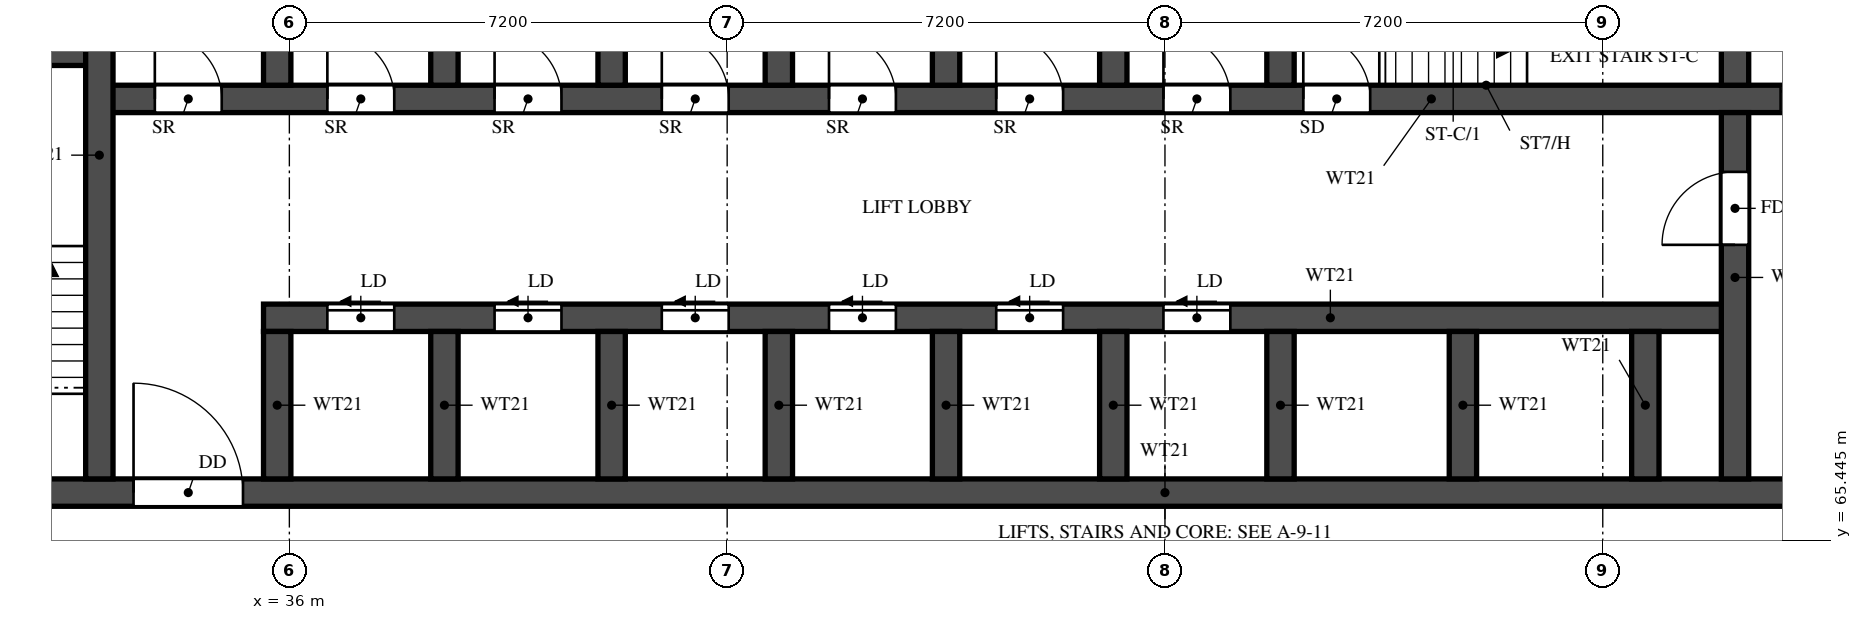
"""IFC4 building model, lengths in metres.
Left out: names, types, materials, properties, quantities, classifications, styles, units other than length and angle.
Written with IfcOpenShell. Run it as: python <this file> out.ifc"""

import sys

from ifc_helpers import new_model, si_unit, direction, frame, frame_2d, origin, place, context, subcontext, project, spatial, rectangle, extrude, element, fill, save


model = new_model("IFC4")
c1 = context("Model", 3, precision=1e-05, world=origin(), true_north=direction((0.0, 1.0)))
c2 = subcontext(c1, "Body", "Model", "MODEL_VIEW")
j1 = project(units=[si_unit("LENGTHUNIT", "METRE"), si_unit("PLANEANGLEUNIT", "RADIAN")], contexts=[c1])
p1 = place(None, origin())
s1 = spatial("IfcSite", under=j1, at=p1, CompositionType="ELEMENT")
p2 = place(p1, origin())
s2 = spatial("IfcBuilding", under=s1, at=p2, CompositionType="ELEMENT")
p3 = place(p2, frame((0.0, 0.0, 69.0)))
s3 = spatial("IfcBuildingStorey", under=s2, at=p3, CompositionType="ELEMENT", Elevation=69.0)
p4 = place(p3, frame((29.7, 66.225, 0.0), z_axis=(0.0, 0.0, 1.0), x_axis=(1.0, 0.0, 0.0)))
e1 = element("IfcWall", 1, at=p4, inside=s3, PredefinedType="SHEAR", context=c2, shape_type="SweptSolid", body=[
    extrude(rectangle(XDim=41.4, YDim=0.45, at=frame_2d((20.7, 0.0))), origin(), (0.0, 0.0, 1.0), 3.18),
])
p5 = place(p4, frame((0.925, 0.0, 0.0)))
e2 = element("IfcOpeningElement", 2, at=p5, cuts=e1, PredefinedType="OPENING", context=c2, shape_type="SweptSolid", body=[
    extrude(rectangle(XDim=1.1, YDim=2.1, at=frame_2d((0.55, 1.05))), frame((0.0, 0.235, 0.0), z_axis=(0.0, -1.0, 0.0), x_axis=(1.0, 0.0, 0.0)), (0.0, 0.0, 1.0), 0.47),
])
p6 = place(p4, frame((3.738, 0.0, 0.0)))
e3 = element("IfcOpeningElement", 3, at=p6, cuts=e1, PredefinedType="OPENING", context=c2, shape_type="SweptSolid", body=[
    extrude(rectangle(XDim=1.8, YDim=2.1, at=frame_2d((0.9, 1.05))), frame((0.0, 0.235, 0.0), z_axis=(0.0, -1.0, 0.0), x_axis=(1.0, 0.0, 0.0)), (0.0, 0.0, 1.0), 0.47),
])
p7 = place(p3, frame((35.575, 69.1, 0.0), z_axis=(0.0, 0.0, 1.0), x_axis=(1.0, 0.0, 0.0)))
e4 = element("IfcWall", 4, at=p7, inside=s3, PredefinedType="SHEAR", context=c2, shape_type="SweptSolid", body=[
    extrude(rectangle(XDim=24.2, YDim=0.45, at=frame_2d((12.1, 0.0))), origin(), (0.0, 0.0, 1.0), 3.18),
])
p8 = place(p7, frame((1.05, 0.0, 0.0)))
e5 = element("IfcOpeningElement", 5, at=p8, cuts=e4, PredefinedType="OPENING", context=c2, shape_type="SweptSolid", body=[
    extrude(rectangle(XDim=1.1, YDim=2.1, at=frame_2d((0.55, 1.05))), frame((0.0, 0.235, 0.0), z_axis=(0.0, -1.0, 0.0), x_axis=(1.0, 0.0, 0.0)), (0.0, 0.0, 1.0), 0.47),
])
p9 = place(p7, frame((3.8, 0.0, 0.0)))
e6 = element("IfcOpeningElement", 6, at=p9, cuts=e4, PredefinedType="OPENING", context=c2, shape_type="SweptSolid", body=[
    extrude(rectangle(XDim=1.1, YDim=2.1, at=frame_2d((0.55, 1.05))), frame((0.0, 0.235, 0.0), z_axis=(0.0, -1.0, 0.0), x_axis=(1.0, 0.0, 0.0)), (0.0, 0.0, 1.0), 0.47),
])
p10 = place(p7, frame((6.55, 0.0, 0.0)))
e7 = element("IfcOpeningElement", 7, at=p10, cuts=e4, PredefinedType="OPENING", context=c2, shape_type="SweptSolid", body=[
    extrude(rectangle(XDim=1.1, YDim=2.1, at=frame_2d((0.55, 1.05))), frame((0.0, 0.235, 0.0), z_axis=(0.0, -1.0, 0.0), x_axis=(1.0, 0.0, 0.0)), (0.0, 0.0, 1.0), 0.47),
])
p11 = place(p7, frame((9.3, 0.0, 0.0)))
e8 = element("IfcOpeningElement", 8, at=p11, cuts=e4, PredefinedType="OPENING", context=c2, shape_type="SweptSolid", body=[
    extrude(rectangle(XDim=1.1, YDim=2.1, at=frame_2d((0.55, 1.05))), frame((0.0, 0.235, 0.0), z_axis=(0.0, -1.0, 0.0), x_axis=(1.0, 0.0, 0.0)), (0.0, 0.0, 1.0), 0.47),
])
p12 = place(p7, frame((12.05, 0.0, 0.0)))
e9 = element("IfcOpeningElement", 9, at=p12, cuts=e4, PredefinedType="OPENING", context=c2, shape_type="SweptSolid", body=[
    extrude(rectangle(XDim=1.1, YDim=2.1, at=frame_2d((0.55, 1.05))), frame((0.0, 0.235, 0.0), z_axis=(0.0, -1.0, 0.0), x_axis=(1.0, 0.0, 0.0)), (0.0, 0.0, 1.0), 0.47),
])
p13 = place(p7, frame((14.8, 0.0, 0.0)))
e10 = element("IfcOpeningElement", 10, at=p13, cuts=e4, PredefinedType="OPENING", context=c2, shape_type="SweptSolid", body=[
    extrude(rectangle(XDim=1.1, YDim=2.1, at=frame_2d((0.55, 1.05))), frame((0.0, 0.235, 0.0), z_axis=(0.0, -1.0, 0.0), x_axis=(1.0, 0.0, 0.0)), (0.0, 0.0, 1.0), 0.47),
])
p14 = place(p3, frame((32.875, 72.7, 0.0), z_axis=(0.0, 0.0, 1.0), x_axis=(1.0, 0.0, 0.0)))
e11 = element("IfcWall", 11, at=p14, inside=s3, PredefinedType="SHEAR", context=c2, shape_type="SweptSolid", body=[
    extrude(rectangle(XDim=35.05, YDim=0.45, at=frame_2d((17.525, 0.0))), origin(), (0.0, 0.0, 1.0), 3.18),
])
p15 = place(p14, frame((19.8, 0.0, 0.0)))
e12 = element("IfcOpeningElement", 12, at=p15, cuts=e11, PredefinedType="OPENING", context=c2, shape_type="SweptSolid", body=[
    extrude(rectangle(XDim=1.1, YDim=2.1, at=frame_2d((0.55, 1.05))), frame((0.0, 0.235, 0.0), z_axis=(0.0, -1.0, 0.0), x_axis=(1.0, 0.0, 0.0)), (0.0, 0.0, 1.0), 0.47),
])
p16 = place(p14, frame((27.65, 0.0, 0.0)))
e13 = element("IfcOpeningElement", 13, at=p16, cuts=e11, PredefinedType="OPENING", context=c2, shape_type="SweptSolid", body=[
    extrude(rectangle(XDim=1.1, YDim=2.1, at=frame_2d((0.55, 1.05))), frame((0.0, 0.235, 0.0), z_axis=(0.0, -1.0, 0.0), x_axis=(1.0, 0.0, 0.0)), (0.0, 0.0, 1.0), 0.47),
])
p17 = place(p14, frame((30.25, 0.0, 0.0)))
e14 = element("IfcOpeningElement", 14, at=p17, cuts=e11, PredefinedType="OPENING", context=c2, shape_type="SweptSolid", body=[
    extrude(rectangle(XDim=1.1, YDim=2.1, at=frame_2d((0.55, 1.05))), frame((0.0, 0.235, 0.0), z_axis=(0.0, -1.0, 0.0), x_axis=(1.0, 0.0, 0.0)), (0.0, 0.0, 1.0), 0.47),
])
p18 = place(p14, frame((3.75, 0.0, 0.0)))
e15 = element("IfcOpeningElement", 15, at=p18, cuts=e11, PredefinedType="OPENING", context=c2, shape_type="SweptSolid", body=[
    extrude(rectangle(XDim=1.1, YDim=2.1, at=frame_2d((0.55, 1.05))), frame((0.0, 0.235, 0.0), z_axis=(0.0, -1.0, 0.0), x_axis=(1.0, 0.0, 0.0)), (0.0, 0.0, 1.0), 0.47),
])
p19 = place(p14, frame((6.5, 0.0, 0.0)))
e16 = element("IfcOpeningElement", 16, at=p19, cuts=e11, PredefinedType="OPENING", context=c2, shape_type="SweptSolid", body=[
    extrude(rectangle(XDim=1.1, YDim=2.1, at=frame_2d((0.55, 1.05))), frame((0.0, 0.235, 0.0), z_axis=(0.0, -1.0, 0.0), x_axis=(1.0, 0.0, 0.0)), (0.0, 0.0, 1.0), 0.47),
])
p20 = place(p14, frame((9.25, 0.0, 0.0)))
e17 = element("IfcOpeningElement", 17, at=p20, cuts=e11, PredefinedType="OPENING", context=c2, shape_type="SweptSolid", body=[
    extrude(rectangle(XDim=1.1, YDim=2.1, at=frame_2d((0.55, 1.05))), frame((0.0, 0.235, 0.0), z_axis=(0.0, -1.0, 0.0), x_axis=(1.0, 0.0, 0.0)), (0.0, 0.0, 1.0), 0.47),
])
p21 = place(p14, frame((12.0, 0.0, 0.0)))
e18 = element("IfcOpeningElement", 18, at=p21, cuts=e11, PredefinedType="OPENING", context=c2, shape_type="SweptSolid", body=[
    extrude(rectangle(XDim=1.1, YDim=2.1, at=frame_2d((0.55, 1.05))), frame((0.0, 0.235, 0.0), z_axis=(0.0, -1.0, 0.0), x_axis=(1.0, 0.0, 0.0)), (0.0, 0.0, 1.0), 0.47),
])
p22 = place(p14, frame((14.75, 0.0, 0.0)))
e19 = element("IfcOpeningElement", 19, at=p22, cuts=e11, PredefinedType="OPENING", context=c2, shape_type="SweptSolid", body=[
    extrude(rectangle(XDim=1.1, YDim=2.1, at=frame_2d((0.55, 1.05))), frame((0.0, 0.235, 0.0), z_axis=(0.0, -1.0, 0.0), x_axis=(1.0, 0.0, 0.0)), (0.0, 0.0, 1.0), 0.47),
])
p23 = place(p14, frame((17.5, 0.0, 0.0)))
e20 = element("IfcOpeningElement", 20, at=p23, cuts=e11, PredefinedType="OPENING", context=c2, shape_type="SweptSolid", body=[
    extrude(rectangle(XDim=1.1, YDim=2.1, at=frame_2d((0.55, 1.05))), frame((0.0, 0.235, 0.0), z_axis=(0.0, -1.0, 0.0), x_axis=(1.0, 0.0, 0.0)), (0.0, 0.0, 1.0), 0.47),
])
p24 = place(p14, frame((0.913, 0.0, 0.0)))
e21 = element("IfcOpeningElement", 21, at=p24, cuts=e11, PredefinedType="OPENING", context=c2, shape_type="SweptSolid", body=[
    extrude(rectangle(XDim=1.1, YDim=2.1, at=frame_2d((0.55, 1.05))), frame((0.0, 0.235, 0.0), z_axis=(0.0, -1.0, 0.0), x_axis=(1.0, 0.0, 0.0)), (0.0, 0.0, 1.0), 0.47),
])
p25 = place(p3, frame((29.7, 73.475, 0.0), z_axis=(0.0, 0.0, 1.0), x_axis=(1.0, 0.0, 0.0)))
e22 = element("IfcWall", 22, at=p25, inside=s3, PredefinedType="SHEAR", context=c2, shape_type="SweptSolid", body=[
    extrude(rectangle(XDim=3.175, YDim=0.45, at=frame_2d((1.587, 0.0))), origin(), (0.0, 0.0, 1.0), 3.18),
])
p26 = place(p3, frame((32.875, 66.45, 0.0), z_axis=(0.0, 0.0, 1.0), x_axis=(0.0, 1.0, 0.0)))
e23 = element("IfcWall", 23, at=p26, inside=s3, PredefinedType="SHEAR", context=c2, shape_type="SweptSolid", body=[
    extrude(rectangle(XDim=10.65, YDim=0.45, at=frame_2d((5.325, 0.0))), origin(), (0.0, 0.0, 1.0), 3.18),
])
p27 = place(p3, frame((59.775, 66.45, 0.0), z_axis=(0.0, 0.0, 1.0), x_axis=(0.0, 1.0, 0.0)))
e24 = element("IfcWall", 24, at=p27, inside=s3, PredefinedType="SHEAR", context=c2, shape_type="SweptSolid", body=[
    extrude(rectangle(XDim=6.025, YDim=0.45, at=frame_2d((3.013, 0.0))), origin(), (0.0, 0.0, 1.0), 3.18),
])
p28 = place(p27, frame((3.85, 0.0, 0.0)))
e25 = element("IfcOpeningElement", 25, at=p28, cuts=e24, PredefinedType="OPENING", context=c2, shape_type="SweptSolid", body=[
    extrude(rectangle(XDim=1.2, YDim=2.1, at=frame_2d((0.6, 1.05))), frame((0.0, 0.235, 0.0), z_axis=(0.0, -1.0, 0.0), x_axis=(1.0, 0.0, 0.0)), (0.0, 0.0, 1.0), 0.47),
])
p29 = place(p3, frame((59.775, 72.925, 0.0), z_axis=(0.0, 0.0, 1.0), x_axis=(0.0, 1.0, 0.0)))
e26 = element("IfcWall", 26, at=p29, inside=s3, PredefinedType="SHEAR", context=c2, shape_type="SweptSolid", body=[
    extrude(rectangle(XDim=2.95, YDim=0.45, at=frame_2d((1.475, 0.0))), origin(), (0.0, 0.0, 1.0), 3.18),
])
for number, where, z_axis, x_axis in (
    (27, (35.8, 66.45, 0.0), (0.0, 0.0, 1.0), (0.0, 1.0, 0.0)),
    (28, (38.55, 66.45, 0.0), (0.0, 0.0, 1.0), (0.0, 1.0, 0.0)),
    (29, (41.3, 66.45, 0.0), (0.0, 0.0, 1.0), (0.0, 1.0, 0.0)),
    (30, (44.05, 66.45, 0.0), (0.0, 0.0, 1.0), (0.0, 1.0, 0.0)),
    (31, (46.8, 66.45, 0.0), (0.0, 0.0, 1.0), (0.0, 1.0, 0.0)),
    (32, (49.55, 66.45, 0.0), (0.0, 0.0, 1.0), (0.0, 1.0, 0.0)),
    (33, (52.3, 66.45, 0.0), (0.0, 0.0, 1.0), (0.0, 1.0, 0.0)),
    (34, (55.3, 66.45, 0.0), (0.0, 0.0, 1.0), (0.0, 1.0, 0.0)),
    (35, (58.3, 66.45, 0.0), (0.0, 0.0, 1.0), (0.0, 1.0, 0.0)),
):
    element("IfcWall", number, at=place(p3, frame(where, z_axis=z_axis, x_axis=x_axis)), inside=s3, PredefinedType="SHEAR", context=c2, shape_type="SweptSolid", body=[
        extrude(rectangle(XDim=2.425, YDim=0.45, at=frame_2d((1.212, 0.0))), origin(), (0.0, 0.0, 1.0), 3.18),
    ])
for number, where, z_axis, x_axis in (
    (36, (35.8, 72.925, 0.0), (0.0, 0.0, 1.0), (0.0, 1.0, 0.0)),
    (37, (38.55, 72.925, 0.0), (0.0, 0.0, 1.0), (0.0, 1.0, 0.0)),
    (38, (41.3, 72.925, 0.0), (0.0, 0.0, 1.0), (0.0, 1.0, 0.0)),
    (39, (44.05, 72.925, 0.0), (0.0, 0.0, 1.0), (0.0, 1.0, 0.0)),
    (40, (46.8, 72.925, 0.0), (0.0, 0.0, 1.0), (0.0, 1.0, 0.0)),
    (41, (49.55, 72.925, 0.0), (0.0, 0.0, 1.0), (0.0, 1.0, 0.0)),
    (42, (52.3, 72.925, 0.0), (0.0, 0.0, 1.0), (0.0, 1.0, 0.0)),
):
    element("IfcWall", number, at=place(p3, frame(where, z_axis=z_axis, x_axis=x_axis)), inside=s3, PredefinedType="SHEAR", context=c2, shape_type="SweptSolid", body=[
        extrude(rectangle(XDim=2.95, YDim=0.45, at=frame_2d((1.475, 0.0))), origin(), (0.0, 0.0, 1.0), 3.18),
    ])
p30 = place(p15, origin())
e43 = element("IfcDoor", 43, at=p30, inside=s3, OperationType="SINGLE_SWING_LEFT", PredefinedType="DOOR", context=c2, shape_type="SweptSolid", body=[
    extrude(rectangle(XDim=1.1, YDim=2.1, at=frame_2d((0.55, 1.05))), frame((0.0, 0.025, 0.0), z_axis=(0.0, -1.0, 0.0), x_axis=(1.0, 0.0, 0.0)), (0.0, 0.0, 1.0), 0.05),
])
fill(e12, e43)
p31 = place(p6, origin())
e44 = element("IfcDoor", 44, at=p31, inside=s3, OperationType="DOUBLE_DOOR_SINGLE_SWING", PredefinedType="DOOR", context=c2, shape_type="SweptSolid", body=[
    extrude(rectangle(XDim=1.8, YDim=2.1, at=frame_2d((0.9, 1.05))), frame((0.0, 0.025, 0.0), z_axis=(0.0, -1.0, 0.0), x_axis=(1.0, 0.0, 0.0)), (0.0, 0.0, 1.0), 0.05),
])
fill(e3, e44)
p32 = place(p28, origin())
e45 = element("IfcDoor", 45, at=p32, inside=s3, OperationType="SINGLE_SWING_RIGHT", PredefinedType="DOOR", context=c2, shape_type="SweptSolid", body=[
    extrude(rectangle(XDim=1.2, YDim=2.1, at=frame_2d((0.6, 1.05))), frame((0.0, 0.025, 0.0), z_axis=(0.0, -1.0, 0.0), x_axis=(1.0, 0.0, 0.0)), (0.0, 0.0, 1.0), 0.05),
])
fill(e25, e45)
p33 = place(p16, origin())
e46 = element("IfcDoor", 46, at=p33, inside=s3, OperationType="SLIDING_TO_LEFT", PredefinedType="DOOR", context=c2, shape_type="SweptSolid", body=[
    extrude(rectangle(XDim=1.1, YDim=2.1, at=frame_2d((0.55, 1.05))), frame((0.0, 0.025, 0.0), z_axis=(0.0, -1.0, 0.0), x_axis=(1.0, 0.0, 0.0)), (0.0, 0.0, 1.0), 0.05),
])
fill(e13, e46)
p34 = place(p8, origin())
e47 = element("IfcDoor", 47, at=p34, inside=s3, OperationType="SLIDING_TO_LEFT", PredefinedType="DOOR", context=c2, shape_type="SweptSolid", body=[
    extrude(rectangle(XDim=1.1, YDim=2.1, at=frame_2d((0.55, 1.05))), frame((0.0, 0.025, 0.0), z_axis=(0.0, -1.0, 0.0), x_axis=(1.0, 0.0, 0.0)), (0.0, 0.0, 1.0), 0.05),
])
fill(e5, e47)
p35 = place(p9, origin())
e48 = element("IfcDoor", 48, at=p35, inside=s3, OperationType="SLIDING_TO_LEFT", PredefinedType="DOOR", context=c2, shape_type="SweptSolid", body=[
    extrude(rectangle(XDim=1.1, YDim=2.1, at=frame_2d((0.55, 1.05))), frame((0.0, 0.025, 0.0), z_axis=(0.0, -1.0, 0.0), x_axis=(1.0, 0.0, 0.0)), (0.0, 0.0, 1.0), 0.05),
])
fill(e6, e48)
p36 = place(p10, origin())
e49 = element("IfcDoor", 49, at=p36, inside=s3, OperationType="SLIDING_TO_LEFT", PredefinedType="DOOR", context=c2, shape_type="SweptSolid", body=[
    extrude(rectangle(XDim=1.1, YDim=2.1, at=frame_2d((0.55, 1.05))), frame((0.0, 0.025, 0.0), z_axis=(0.0, -1.0, 0.0), x_axis=(1.0, 0.0, 0.0)), (0.0, 0.0, 1.0), 0.05),
])
fill(e7, e49)
p37 = place(p11, origin())
e50 = element("IfcDoor", 50, at=p37, inside=s3, OperationType="SLIDING_TO_LEFT", PredefinedType="DOOR", context=c2, shape_type="SweptSolid", body=[
    extrude(rectangle(XDim=1.1, YDim=2.1, at=frame_2d((0.55, 1.05))), frame((0.0, 0.025, 0.0), z_axis=(0.0, -1.0, 0.0), x_axis=(1.0, 0.0, 0.0)), (0.0, 0.0, 1.0), 0.05),
])
fill(e8, e50)
p38 = place(p12, origin())
e51 = element("IfcDoor", 51, at=p38, inside=s3, OperationType="SLIDING_TO_LEFT", PredefinedType="DOOR", context=c2, shape_type="SweptSolid", body=[
    extrude(rectangle(XDim=1.1, YDim=2.1, at=frame_2d((0.55, 1.05))), frame((0.0, 0.025, 0.0), z_axis=(0.0, -1.0, 0.0), x_axis=(1.0, 0.0, 0.0)), (0.0, 0.0, 1.0), 0.05),
])
fill(e9, e51)
p39 = place(p13, origin())
e52 = element("IfcDoor", 52, at=p39, inside=s3, OperationType="SLIDING_TO_LEFT", PredefinedType="DOOR", context=c2, shape_type="SweptSolid", body=[
    extrude(rectangle(XDim=1.1, YDim=2.1, at=frame_2d((0.55, 1.05))), frame((0.0, 0.025, 0.0), z_axis=(0.0, -1.0, 0.0), x_axis=(1.0, 0.0, 0.0)), (0.0, 0.0, 1.0), 0.05),
])
fill(e10, e52)
p40 = place(p18, origin())
e53 = element("IfcDoor", 53, at=p40, inside=s3, OperationType="SINGLE_SWING_LEFT", PredefinedType="DOOR", context=c2, shape_type="SweptSolid", body=[
    extrude(rectangle(XDim=1.1, YDim=2.1, at=frame_2d((0.55, 1.05))), frame((0.0, 0.025, 0.0), z_axis=(0.0, -1.0, 0.0), x_axis=(1.0, 0.0, 0.0)), (0.0, 0.0, 1.0), 0.05),
])
fill(e15, e53)
p41 = place(p19, origin())
e54 = element("IfcDoor", 54, at=p41, inside=s3, OperationType="SINGLE_SWING_LEFT", PredefinedType="DOOR", context=c2, shape_type="SweptSolid", body=[
    extrude(rectangle(XDim=1.1, YDim=2.1, at=frame_2d((0.55, 1.05))), frame((0.0, 0.025, 0.0), z_axis=(0.0, -1.0, 0.0), x_axis=(1.0, 0.0, 0.0)), (0.0, 0.0, 1.0), 0.05),
])
fill(e16, e54)
p42 = place(p20, origin())
e55 = element("IfcDoor", 55, at=p42, inside=s3, OperationType="SINGLE_SWING_LEFT", PredefinedType="DOOR", context=c2, shape_type="SweptSolid", body=[
    extrude(rectangle(XDim=1.1, YDim=2.1, at=frame_2d((0.55, 1.05))), frame((0.0, 0.025, 0.0), z_axis=(0.0, -1.0, 0.0), x_axis=(1.0, 0.0, 0.0)), (0.0, 0.0, 1.0), 0.05),
])
fill(e17, e55)
p43 = place(p21, origin())
e56 = element("IfcDoor", 56, at=p43, inside=s3, OperationType="SINGLE_SWING_LEFT", PredefinedType="DOOR", context=c2, shape_type="SweptSolid", body=[
    extrude(rectangle(XDim=1.1, YDim=2.1, at=frame_2d((0.55, 1.05))), frame((0.0, 0.025, 0.0), z_axis=(0.0, -1.0, 0.0), x_axis=(1.0, 0.0, 0.0)), (0.0, 0.0, 1.0), 0.05),
])
fill(e18, e56)
p44 = place(p22, origin())
e57 = element("IfcDoor", 57, at=p44, inside=s3, OperationType="SINGLE_SWING_LEFT", PredefinedType="DOOR", context=c2, shape_type="SweptSolid", body=[
    extrude(rectangle(XDim=1.1, YDim=2.1, at=frame_2d((0.55, 1.05))), frame((0.0, 0.025, 0.0), z_axis=(0.0, -1.0, 0.0), x_axis=(1.0, 0.0, 0.0)), (0.0, 0.0, 1.0), 0.05),
])
fill(e19, e57)
p45 = place(p23, origin())
e58 = element("IfcDoor", 58, at=p45, inside=s3, OperationType="SINGLE_SWING_LEFT", PredefinedType="DOOR", context=c2, shape_type="SweptSolid", body=[
    extrude(rectangle(XDim=1.1, YDim=2.1, at=frame_2d((0.55, 1.05))), frame((0.0, 0.025, 0.0), z_axis=(0.0, -1.0, 0.0), x_axis=(1.0, 0.0, 0.0)), (0.0, 0.0, 1.0), 0.05),
])
fill(e20, e58)
p46 = place(p24, origin())
e59 = element("IfcDoor", 59, at=p46, inside=s3, OperationType="SINGLE_SWING_LEFT", PredefinedType="DOOR", context=c2, shape_type="SweptSolid", body=[
    extrude(rectangle(XDim=1.1, YDim=2.1, at=frame_2d((0.55, 1.05))), frame((0.0, 0.025, 0.0), z_axis=(0.0, -1.0, 0.0), x_axis=(1.0, 0.0, 0.0)), (0.0, 0.0, 1.0), 0.05),
])
fill(e21, e59)
save(model, sys.argv[1])
